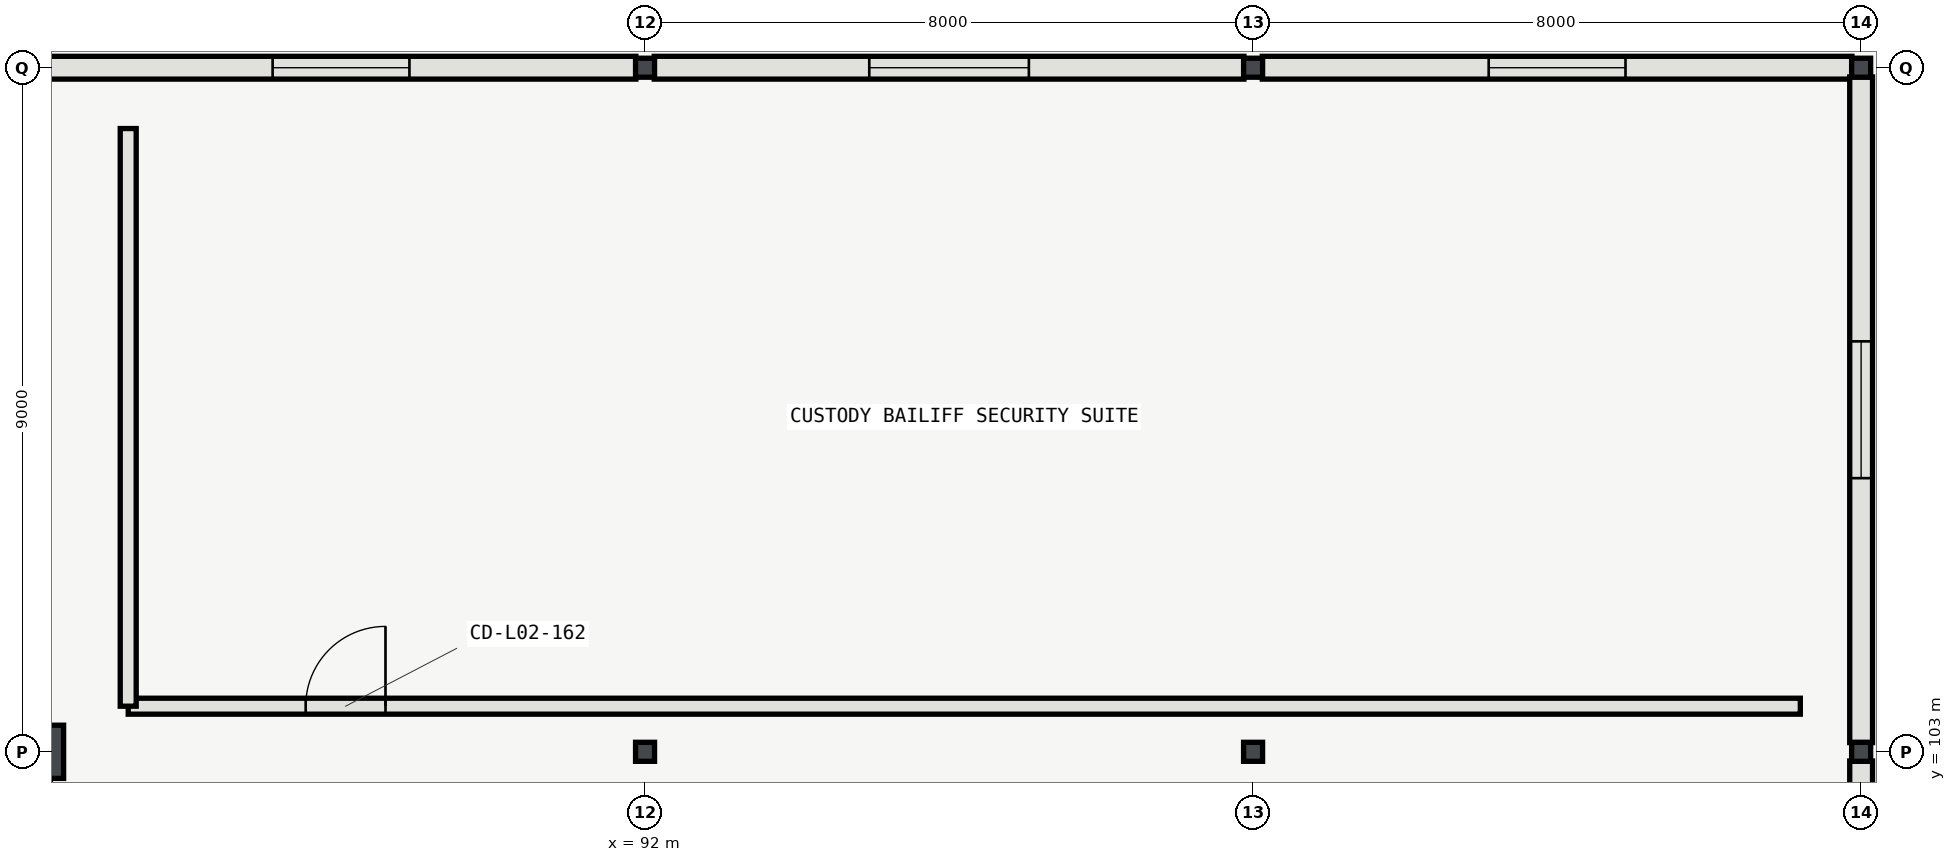
"""IFC4 building model, lengths in metres.
Left out: names, types, materials, properties, quantities, classifications, styles, units other than length and angle.
Written with IfcOpenShell. Run it as: python <this file> out.ifc"""

import sys

from ifc_helpers import new_model, si_unit, direction, frame, frame_2d, origin, origin_2d, place, context, subcontext, project, spatial, rectangle, i_section, extrude, element, fill, save


model = new_model("IFC4")
c1 = context("Model", 3, precision=1e-05, world=origin(), true_north=direction((0.0, 1.0)))
c2 = subcontext(c1, "Body", "Model", "MODEL_VIEW")
j1 = project(units=[si_unit("LENGTHUNIT", "METRE"), si_unit("PLANEANGLEUNIT", "RADIAN")], contexts=[c1])
p1 = place(None, origin())
s1 = spatial("IfcSite", under=j1, at=p1, CompositionType="ELEMENT")
p2 = place(p1, origin())
s2 = spatial("IfcBuilding", under=s1, at=p2, CompositionType="ELEMENT")
p3 = place(p2, frame((0.0, 0.0, 10.8)))
s3 = spatial("IfcBuildingStorey", under=s2, at=p3, CompositionType="ELEMENT", Elevation=10.8)
p4 = place(p3, frame((84.0, 103.0, 0.0), z_axis=(0.0, 0.0, 1.0), x_axis=(1.0, 0.0, 0.0)))
e1 = element("IfcColumn", 1, at=p4, inside=s3, PredefinedType="COLUMN", context=c2, shape_type="SweptSolid", body=[
    extrude(rectangle(XDim=0.7, YDim=0.7, at=origin_2d()), origin(), (0.0, 0.0, 1.0), 5.4),
])
for number, where, z_axis, x_axis in (
    (2, (92.0, 103.0, 0.0), (0.0, 0.0, 1.0), (1.0, 0.0, 0.0)),
    (3, (92.0, 112.0, 0.0), (0.0, 0.0, 1.0), (1.0, 0.0, 0.0)),
    (4, (100.0, 103.0, 0.0), (0.0, 0.0, 1.0), (1.0, 0.0, 0.0)),
    (5, (100.0, 112.0, 0.0), (0.0, 0.0, 1.0), (1.0, 0.0, 0.0)),
    (6, (108.0, 103.0, 0.0), (0.0, 0.0, 1.0), (1.0, 0.0, 0.0)),
    (7, (108.0, 112.0, 0.0), (0.0, 0.0, 1.0), (1.0, 0.0, 0.0)),
):
    element("IfcColumn", number, at=place(p3, frame(where, z_axis=z_axis, x_axis=x_axis)), inside=s3, PredefinedType="COLUMN", context=c2, shape_type="SweptSolid", body=[
        extrude(i_section(OverallWidth=0.25, OverallDepth=0.25, WebThickness=0.009, FlangeThickness=0.014, FilletRadius=0.016, at=origin_2d()), origin(), (0.0, 0.0, 1.0), 5.4),
    ])
p5 = place(p3, frame((91.879, 112.0, 0.0), z_axis=(0.0, 0.0, 1.0), x_axis=(-1.0, 0.0, 0.0)))
e8 = element("IfcWall", 8, at=p5, inside=s3, PredefinedType="SOLIDWALL", context=c2, shape_type="SweptSolid", body=[
    extrude(rectangle(XDim=7.758, YDim=0.3, at=frame_2d((3.879, 0.0))), origin(), (0.0, 0.0, 1.0), 4.783),
])
p6 = place(p5, frame((2.979, 0.0, 2.4)))
e9 = element("IfcOpeningElement", 9, at=p6, cuts=e8, PredefinedType="OPENING", context=c2, shape_type="SweptSolid", body=[
    extrude(rectangle(XDim=1.8, YDim=0.85, at=frame_2d((0.9, 0.425))), frame((0.0, 0.16, 0.0), z_axis=(0.0, -1.0, 0.0), x_axis=(1.0, 0.0, 0.0)), (0.0, 0.0, 1.0), 0.32),
])
p7 = place(p3, frame((99.879, 112.0, 0.0), z_axis=(0.0, 0.0, 1.0), x_axis=(-1.0, 0.0, 0.0)))
e10 = element("IfcWall", 10, at=p7, inside=s3, PredefinedType="SOLIDWALL", context=c2, shape_type="SweptSolid", body=[
    extrude(rectangle(XDim=7.758, YDim=0.3, at=frame_2d((3.879, 0.0))), origin(), (0.0, 0.0, 1.0), 4.783),
])
p8 = place(p7, frame((2.829, 0.0, 2.4)))
e11 = element("IfcOpeningElement", 11, at=p8, cuts=e10, PredefinedType="OPENING", context=c2, shape_type="SweptSolid", body=[
    extrude(rectangle(XDim=2.1, YDim=0.85, at=frame_2d((1.05, 0.425))), frame((0.0, 0.16, 0.0), z_axis=(0.0, -1.0, 0.0), x_axis=(1.0, 0.0, 0.0)), (0.0, 0.0, 1.0), 0.32),
])
p9 = place(p3, frame((107.879, 112.0, 0.0), z_axis=(0.0, 0.0, 1.0), x_axis=(-1.0, 0.0, 0.0)))
e12 = element("IfcWall", 12, at=p9, inside=s3, PredefinedType="SOLIDWALL", context=c2, shape_type="SweptSolid", body=[
    extrude(rectangle(XDim=7.758, YDim=0.3, at=frame_2d((3.879, 0.0))), origin(), (0.0, 0.0, 1.0), 4.783),
])
p10 = place(p9, frame((2.979, 0.0, 2.4)))
e13 = element("IfcOpeningElement", 13, at=p10, cuts=e12, PredefinedType="OPENING", context=c2, shape_type="SweptSolid", body=[
    extrude(rectangle(XDim=1.8, YDim=0.85, at=frame_2d((0.9, 0.425))), frame((0.0, 0.16, 0.0), z_axis=(0.0, -1.0, 0.0), x_axis=(1.0, 0.0, 0.0)), (0.0, 0.0, 1.0), 0.32),
])
p11 = place(p3, frame((108.0, 94.171, 0.0), z_axis=(0.0, 0.0, 1.0), x_axis=(0.0, 1.0, 0.0)))
e14 = element("IfcWall", 14, at=p11, inside=s3, PredefinedType="SOLIDWALL", context=c2, shape_type="SweptSolid", body=[
    extrude(rectangle(XDim=8.708, YDim=0.3, at=frame_2d((4.354, 0.0))), origin(), (0.0, 0.0, 1.0), 4.783),
])
p12 = place(p11, frame((3.279, 0.0, 2.4)))
e15 = element("IfcOpeningElement", 15, at=p12, cuts=e14, PredefinedType="OPENING", context=c2, shape_type="SweptSolid", body=[
    extrude(rectangle(XDim=2.1, YDim=0.85, at=frame_2d((1.05, 0.425))), frame((0.0, 0.16, 0.0), z_axis=(0.0, -1.0, 0.0), x_axis=(1.0, 0.0, 0.0)), (0.0, 0.0, 1.0), 0.32),
])
p13 = place(p3, frame((108.0, 103.121, 0.0), z_axis=(0.0, 0.0, 1.0), x_axis=(0.0, 1.0, 0.0)))
e16 = element("IfcWall", 16, at=p13, inside=s3, PredefinedType="SOLIDWALL", context=c2, shape_type="SweptSolid", body=[
    extrude(rectangle(XDim=8.758, YDim=0.3, at=frame_2d((4.379, 0.0))), origin(), (0.0, 0.0, 1.0), 4.783),
])
p14 = place(p13, frame((3.479, 0.0, 2.4)))
e17 = element("IfcOpeningElement", 17, at=p14, cuts=e16, PredefinedType="OPENING", context=c2, shape_type="SweptSolid", body=[
    extrude(rectangle(XDim=1.8, YDim=0.85, at=frame_2d((0.9, 0.425))), frame((0.0, 0.16, 0.0), z_axis=(0.0, -1.0, 0.0), x_axis=(1.0, 0.0, 0.0)), (0.0, 0.0, 1.0), 0.32),
])
p15 = place(p3, frame((85.2, 103.6, 0.0), z_axis=(0.0, 0.0, 1.0), x_axis=(1.0, 0.0, 0.0)))
e18 = element("IfcWall", 18, at=p15, inside=s3, PredefinedType="PARTITIONING", context=c2, shape_type="SweptSolid", body=[
    extrude(rectangle(XDim=22.0, YDim=0.21, at=frame_2d((11.0, 0.0))), origin(), (0.0, 0.0, 1.0), 5.12),
])
p16 = place(p15, frame((2.335, 0.0, 0.0)))
e19 = element("IfcOpeningElement", 19, at=p16, cuts=e18, PredefinedType="OPENING", context=c2, shape_type="SweptSolid", body=[
    extrude(rectangle(XDim=1.05, YDim=2.15, at=frame_2d((0.525, 1.075))), frame((0.0, 0.115, 0.0), z_axis=(0.0, -1.0, 0.0), x_axis=(1.0, 0.0, 0.0)), (0.0, 0.0, 1.0), 0.23),
])
p17 = place(p3, frame((85.2, 111.2, 0.0), z_axis=(0.0, 0.0, 1.0), x_axis=(0.0, -1.0, 0.0)))
e20 = element("IfcWall", 20, at=p17, inside=s3, PredefinedType="PARTITIONING", context=c2, shape_type="SweptSolid", body=[
    extrude(rectangle(XDim=7.6, YDim=0.21, at=frame_2d((3.8, 0.0))), origin(), (0.0, 0.0, 1.0), 5.12),
])
p18 = place(p6, origin())
e21 = element("IfcWindow", 21, at=p18, inside=s3, PartitioningType="SINGLE_PANEL", PredefinedType="WINDOW", context=c2, shape_type="SweptSolid", body=[
    extrude(rectangle(XDim=1.8, YDim=0.85, at=frame_2d((0.9, 0.425))), frame((0.0, 0.03, 0.0), z_axis=(0.0, -1.0, 0.0), x_axis=(1.0, 0.0, 0.0)), (0.0, 0.0, 1.0), 0.06),
])
fill(e9, e21)
p19 = place(p8, origin())
e22 = element("IfcWindow", 22, at=p19, inside=s3, PartitioningType="SINGLE_PANEL", PredefinedType="WINDOW", context=c2, shape_type="SweptSolid", body=[
    extrude(rectangle(XDim=2.1, YDim=0.85, at=frame_2d((1.05, 0.425))), frame((0.0, 0.03, 0.0), z_axis=(0.0, -1.0, 0.0), x_axis=(1.0, 0.0, 0.0)), (0.0, 0.0, 1.0), 0.06),
])
fill(e11, e22)
p20 = place(p10, origin())
e23 = element("IfcWindow", 23, at=p20, inside=s3, PartitioningType="SINGLE_PANEL", PredefinedType="WINDOW", context=c2, shape_type="SweptSolid", body=[
    extrude(rectangle(XDim=1.8, YDim=0.85, at=frame_2d((0.9, 0.425))), frame((0.0, 0.03, 0.0), z_axis=(0.0, -1.0, 0.0), x_axis=(1.0, 0.0, 0.0)), (0.0, 0.0, 1.0), 0.06),
])
fill(e13, e23)
p21 = place(p14, origin())
e24 = element("IfcWindow", 24, at=p21, inside=s3, PartitioningType="SINGLE_PANEL", PredefinedType="WINDOW", context=c2, shape_type="SweptSolid", body=[
    extrude(rectangle(XDim=1.8, YDim=0.85, at=frame_2d((0.9, 0.425))), frame((0.0, 0.03, 0.0), z_axis=(0.0, -1.0, 0.0), x_axis=(1.0, 0.0, 0.0)), (0.0, 0.0, 1.0), 0.06),
])
fill(e17, e24)
p22 = place(p16, origin())
e25 = element("IfcDoor", 25, at=p22, inside=s3, OperationType="SINGLE_SWING_RIGHT", PredefinedType="DOOR", context=c2, shape_type="SweptSolid", body=[
    extrude(rectangle(XDim=1.05, YDim=2.15, at=frame_2d((0.525, 1.075))), frame((0.0, 0.025, 0.0), z_axis=(0.0, -1.0, 0.0), x_axis=(1.0, 0.0, 0.0)), (0.0, 0.0, 1.0), 0.05),
])
fill(e19, e25)
save(model, sys.argv[1])
